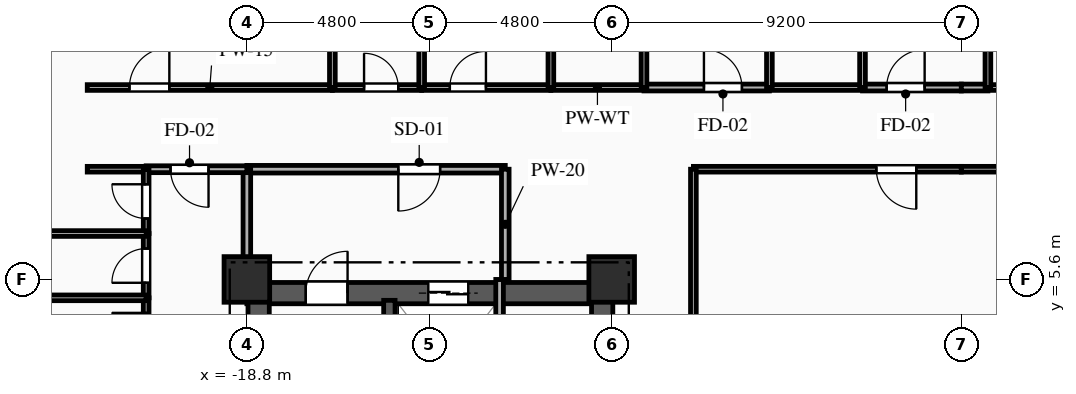
"""IFC4 building model, lengths in metres.
Left out: names, types, materials, properties, quantities, classifications, styles, units other than length and angle.
Written with IfcOpenShell. Run it as: python <this file> out.ifc"""

import sys

from ifc_helpers import new_model, si_unit, direction, frame, frame_2d, origin, origin_2d, place, context, subcontext, project, spatial, rectangle, extrude, element, fill, save


model = new_model("IFC4")
c1 = context("Model", 3, precision=1e-05, world=origin(), true_north=direction((0.0, 1.0)))
c2 = subcontext(c1, "Body", "Model", "MODEL_VIEW")
j1 = project(units=[si_unit("LENGTHUNIT", "METRE"), si_unit("PLANEANGLEUNIT", "RADIAN")], contexts=[c1])
p1 = place(None, origin())
s1 = spatial("IfcSite", under=j1, at=p1, CompositionType="ELEMENT")
p2 = place(p1, origin())
s2 = spatial("IfcBuilding", under=s1, at=p2, CompositionType="ELEMENT")
p3 = place(p2, frame((0.0, 0.0, 53.8)))
s3 = spatial("IfcBuildingStorey", under=s2, at=p3, CompositionType="ELEMENT", Elevation=53.8)
for number, where, z_axis, x_axis in (
    (1, (-18.8, 5.6, 0.0), (0.0, 0.0, 1.0), (1.0, 0.0, 0.0)),
    (2, (-9.2, 5.6, 0.0), (0.0, 0.0, 1.0), (1.0, 0.0, 0.0)),
):
    element("IfcColumn", number, at=place(p3, frame(where, z_axis=z_axis, x_axis=x_axis)), inside=s3, PredefinedType="COLUMN", context=c2, shape_type="SweptSolid", body=[
        extrude(rectangle(XDim=1.2, YDim=1.2, at=origin_2d()), origin(), (0.0, 0.0, 1.0), 3.35),
    ])
p4 = place(p3, frame((-18.8, 5.24, 0.0), z_axis=(0.0, 0.0, 1.0), x_axis=(1.0, 0.0, 0.0)))
e3 = element("IfcWall", 3, at=p4, inside=s3, PredefinedType="SHEAR", context=c2, shape_type="SweptSolid", body=[
    extrude(rectangle(XDim=9.6, YDim=0.56, at=frame_2d((4.8, 0.0))), origin(), (0.0, 0.0, 1.0), 3.035),
])
p5 = place(p4, frame((1.55, 0.0, 0.0)))
e4 = element("IfcOpeningElement", 4, at=p5, cuts=e3, PredefinedType="OPENING", context=c2, shape_type="SweptSolid", body=[
    extrude(rectangle(XDim=1.1, YDim=2.15, at=frame_2d((0.55, 1.075))), frame((0.0, 0.29, 0.0), z_axis=(0.0, -1.0, 0.0), x_axis=(1.0, 0.0, 0.0)), (0.0, 0.0, 1.0), 0.58),
])
p6 = place(p4, frame((4.775, 0.0, 0.0)))
e5 = element("IfcOpeningElement", 5, at=p6, cuts=e3, PredefinedType="OPENING", context=c2, shape_type="SweptSolid", body=[
    extrude(rectangle(XDim=1.05, YDim=2.1, at=frame_2d((0.525, 1.05))), frame((0.0, 0.29, 0.0), z_axis=(0.0, -1.0, 0.0), x_axis=(1.0, 0.0, 0.0)), (0.0, 0.0, 1.0), 0.58),
])
p7 = place(p3, frame((-18.49, -5.05, 0.0), z_axis=(0.0, 0.0, 1.0), x_axis=(0.0, 1.0, 0.0)))
e6 = element("IfcWall", 6, at=p7, inside=s3, PredefinedType="SHEAR", context=c2, shape_type="SweptSolid", body=[
    extrude(rectangle(XDim=10.1, YDim=0.56, at=frame_2d((5.05, 0.0))), origin(), (0.0, 0.0, 1.0), 3.035),
])
p8 = place(p3, frame((-9.45, -5.05, 0.0), z_axis=(0.0, 0.0, 1.0), x_axis=(0.0, 1.0, 0.0)))
e7 = element("IfcWall", 7, at=p8, inside=s3, PredefinedType="SHEAR", context=c2, shape_type="SweptSolid", body=[
    extrude(rectangle(XDim=10.1, YDim=0.56, at=frame_2d((5.05, 0.0))), origin(), (0.0, 0.0, 1.0), 3.035),
])
p9 = place(p8, frame((7.15, 0.0, 0.0)))
e8 = element("IfcOpeningElement", 8, at=p9, cuts=e7, PredefinedType="OPENING", context=c2, shape_type="SweptSolid", body=[
    extrude(rectangle(XDim=0.9, YDim=2.1, at=frame_2d((0.45, 1.05))), frame((0.0, 0.29, 0.0), z_axis=(0.0, -1.0, 0.0), x_axis=(1.0, 0.0, 0.0)), (0.0, 0.0, 1.0), 0.58),
])
p10 = place(p8, frame((2.4, 0.0, 0.0)))
e9 = element("IfcOpeningElement", 9, at=p10, cuts=e7, PredefinedType="OPENING", context=c2, shape_type="SweptSolid", body=[
    extrude(rectangle(XDim=1.2, YDim=2.15, at=frame_2d((0.6, 1.075))), frame((0.0, 0.29, 0.0), z_axis=(0.0, -1.0, 0.0), x_axis=(1.0, 0.0, 0.0)), (0.0, 0.0, 1.0), 0.58),
])
p11 = place(p3, frame((-15.05, -5.05, 0.0), z_axis=(0.0, 0.0, 1.0), x_axis=(0.0, 1.0, 0.0)))
e10 = element("IfcWall", 10, at=p11, inside=s3, PredefinedType="SHEAR", context=c2, shape_type="SweptSolid", body=[
    extrude(rectangle(XDim=10.1, YDim=0.3, at=frame_2d((5.05, 0.0))), origin(), (0.0, 0.0, 1.0), 3.035),
])
p12 = place(p3, frame((-12.15, 1.55, 0.0), z_axis=(0.0, 0.0, 1.0), x_axis=(0.0, 1.0, 0.0)))
e11 = element("IfcWall", 11, at=p12, inside=s3, PredefinedType="PARTITIONING", context=c2, shape_type="SweptSolid", body=[
    extrude(rectangle(XDim=4.05, YDim=0.2, at=frame_2d((2.025, 0.0))), origin(), (0.0, 0.0, 1.0), 3.035),
])
p13 = place(p3, frame((-12.0, 8.5, 0.0), z_axis=(0.0, 0.0, 1.0), x_axis=(-1.0, 0.0, 0.0)))
e12 = element("IfcWall", 12, at=p13, inside=s3, PredefinedType="PARTITIONING", context=c2, shape_type="SweptSolid", body=[
    extrude(rectangle(XDim=6.8, YDim=0.2, at=frame_2d((3.4, 0.0))), origin(), (0.0, 0.0, 1.0), 3.035),
])
p14 = place(p13, frame((1.715, 0.0, 0.0)))
e13 = element("IfcOpeningElement", 13, at=p14, cuts=e12, PredefinedType="OPENING", context=c2, shape_type="SweptSolid", body=[
    extrude(rectangle(XDim=1.1, YDim=2.15, at=frame_2d((0.55, 1.075))), frame((0.0, 0.11, 0.0), z_axis=(0.0, -1.0, 0.0), x_axis=(1.0, 0.0, 0.0)), (0.0, 0.0, 1.0), 0.22),
])
p15 = place(p3, frame((-12.0, 5.6, 0.0), z_axis=(0.0, 0.0, 1.0), x_axis=(0.0, 1.0, 0.0)))
e14 = element("IfcWall", 14, at=p15, inside=s3, PredefinedType="PARTITIONING", context=c2, shape_type="SweptSolid", body=[
    extrude(rectangle(XDim=2.9, YDim=0.2, at=frame_2d((1.45, 0.0))), origin(), (0.0, 0.0, 1.0), 3.035),
])
p16 = place(p3, frame((-18.8, 8.5, 0.0), z_axis=(0.0, 0.0, 1.0), x_axis=(0.0, -1.0, 0.0)))
e15 = element("IfcWall", 15, at=p16, inside=s3, PredefinedType="PARTITIONING", context=c2, shape_type="SweptSolid", body=[
    extrude(rectangle(XDim=2.9, YDim=0.2, at=frame_2d((1.45, 0.0))), origin(), (0.0, 0.0, 1.0), 2.52),
])
p17 = place(p3, frame((-18.8, 8.5, 0.0), z_axis=(0.0, 0.0, 1.0), x_axis=(-1.0, 0.0, 0.0)))
e16 = element("IfcWall", 16, at=p17, inside=s3, PredefinedType="PARTITIONING", context=c2, shape_type="SweptSolid", body=[
    extrude(rectangle(XDim=2.65, YDim=0.18, at=frame_2d((1.325, 0.0))), origin(), (0.0, 0.0, 1.0), 3.035),
])
p18 = place(p17, frame((1.009, 0.0, 0.0)))
e17 = element("IfcOpeningElement", 17, at=p18, cuts=e16, PredefinedType="OPENING", context=c2, shape_type="SweptSolid", body=[
    extrude(rectangle(XDim=1.0, YDim=2.15, at=frame_2d((0.5, 1.075))), frame((0.0, 0.1, 0.0), z_axis=(0.0, -1.0, 0.0), x_axis=(1.0, 0.0, 0.0)), (0.0, 0.0, 1.0), 0.2),
])
p19 = place(p3, frame((-21.45, 8.5, 0.0), z_axis=(0.0, 0.0, 1.0), x_axis=(-1.0, 0.0, 0.0)))
e18 = element("IfcWall", 18, at=p19, inside=s3, PredefinedType="PARTITIONING", context=c2, shape_type="SweptSolid", body=[
    extrude(rectangle(XDim=1.55, YDim=0.15, at=frame_2d((0.775, 0.0))), origin(), (0.0, 0.0, 1.0), 3.035),
])
p20 = place(p3, frame((-23.0, 10.65, 0.0), z_axis=(0.0, 0.0, 1.0), x_axis=(1.0, 0.0, 0.0)))
e19 = element("IfcWall", 19, at=p20, inside=s3, PredefinedType="PARTITIONING", context=c2, shape_type="SweptSolid", body=[
    extrude(rectangle(XDim=6.45, YDim=0.15, at=frame_2d((3.225, 0.0))), origin(), (0.0, 0.0, 1.0), 3.035),
])
p21 = place(p20, frame((1.11, 0.0, 0.0)))
e20 = element("IfcOpeningElement", 20, at=p21, cuts=e19, PredefinedType="OPENING", context=c2, shape_type="SweptSolid", body=[
    extrude(rectangle(XDim=1.05, YDim=2.15, at=frame_2d((0.525, 1.075))), frame((0.0, 0.085, 0.0), z_axis=(0.0, -1.0, 0.0), x_axis=(1.0, 0.0, 0.0)), (0.0, 0.0, 1.0), 0.17),
])
p22 = place(p3, frame((-16.55, 10.65, 0.0), z_axis=(0.0, 0.0, 1.0), x_axis=(1.0, 0.0, 0.0)))
e21 = element("IfcWall", 21, at=p22, inside=s3, PredefinedType="PLUMBINGWALL", context=c2, shape_type="SweptSolid", body=[
    extrude(rectangle(XDim=2.35, YDim=0.15, at=frame_2d((1.175, 0.0))), origin(), (0.0, 0.0, 1.0), 3.035),
])
p23 = place(p22, frame((0.834, 0.0, 0.0)))
e22 = element("IfcOpeningElement", 22, at=p23, cuts=e21, PredefinedType="OPENING", context=c2, shape_type="SweptSolid", body=[
    extrude(rectangle(XDim=0.9, YDim=2.1, at=frame_2d((0.45, 1.05))), frame((0.0, 0.085, 0.0), z_axis=(0.0, -1.0, 0.0), x_axis=(1.0, 0.0, 0.0)), (0.0, 0.0, 1.0), 0.17),
])
p24 = place(p3, frame((-14.2, 10.65, 0.0), z_axis=(0.0, 0.0, 1.0), x_axis=(1.0, 0.0, 0.0)))
e23 = element("IfcWall", 23, at=p24, inside=s3, PredefinedType="PARTITIONING", context=c2, shape_type="SweptSolid", body=[
    extrude(rectangle(XDim=3.4, YDim=0.15, at=frame_2d((1.7, 0.0))), origin(), (0.0, 0.0, 1.0), 3.035),
])
p25 = place(p24, frame((0.741, 0.0, 0.0)))
e24 = element("IfcOpeningElement", 24, at=p25, cuts=e23, PredefinedType="OPENING", context=c2, shape_type="SweptSolid", body=[
    extrude(rectangle(XDim=0.95, YDim=2.1, at=frame_2d((0.475, 1.05))), frame((0.0, 0.085, 0.0), z_axis=(0.0, -1.0, 0.0), x_axis=(1.0, 0.0, 0.0)), (0.0, 0.0, 1.0), 0.17),
])
p26 = place(p3, frame((-8.35, 10.65, 0.0), z_axis=(0.0, 0.0, 1.0), x_axis=(1.0, 0.0, 0.0)))
e25 = element("IfcWall", 25, at=p26, inside=s3, PredefinedType="PARTITIONING", context=c2, shape_type="SweptSolid", body=[
    extrude(rectangle(XDim=3.3, YDim=0.18, at=frame_2d((1.65, 0.0))), origin(), (0.0, 0.0, 1.0), 3.035),
])
p27 = place(p26, frame((1.577, 0.0, 0.0)))
e26 = element("IfcOpeningElement", 26, at=p27, cuts=e25, PredefinedType="OPENING", context=c2, shape_type="SweptSolid", body=[
    extrude(rectangle(XDim=1.0, YDim=2.15, at=frame_2d((0.5, 1.075))), frame((0.0, 0.1, 0.0), z_axis=(0.0, -1.0, 0.0), x_axis=(1.0, 0.0, 0.0)), (0.0, 0.0, 1.0), 0.2),
])
p28 = place(p3, frame((-10.8, 10.65, 0.0), z_axis=(0.0, 0.0, 1.0), x_axis=(1.0, 0.0, 0.0)))
e27 = element("IfcWall", 27, at=p28, inside=s3, PredefinedType="PLUMBINGWALL", context=c2, shape_type="SweptSolid", body=[
    extrude(rectangle(XDim=2.45, YDim=0.15, at=frame_2d((1.225, 0.0))), origin(), (0.0, 0.0, 1.0), 3.035),
])
p29 = place(p3, frame((-2.6, 10.65, 0.0), z_axis=(0.0, 0.0, 1.0), x_axis=(1.0, 0.0, 0.0)))
e28 = element("IfcWall", 28, at=p29, inside=s3, PredefinedType="PARTITIONING", context=c2, shape_type="SweptSolid", body=[
    extrude(rectangle(XDim=2.6, YDim=0.18, at=frame_2d((1.3, 0.0))), origin(), (0.0, 0.0, 1.0), 3.035),
])
p30 = place(p29, frame((0.635, 0.0, 0.0)))
e29 = element("IfcOpeningElement", 29, at=p30, cuts=e28, PredefinedType="OPENING", context=c2, shape_type="SweptSolid", body=[
    extrude(rectangle(XDim=1.0, YDim=2.15, at=frame_2d((0.5, 1.075))), frame((0.0, 0.1, 0.0), z_axis=(0.0, -1.0, 0.0), x_axis=(1.0, 0.0, 0.0)), (0.0, 0.0, 1.0), 0.2),
])
p31 = place(p3, frame((-5.05, 10.65, 0.0), z_axis=(0.0, 0.0, 1.0), x_axis=(1.0, 0.0, 0.0)))
e30 = element("IfcWall", 30, at=p31, inside=s3, PredefinedType="PLUMBINGWALL", context=c2, shape_type="SweptSolid", body=[
    extrude(rectangle(XDim=2.45, YDim=0.15, at=frame_2d((1.225, 0.0))), origin(), (0.0, 0.0, 1.0), 3.035),
])
p32 = place(p3, frame((0.0, 8.5, 0.0), z_axis=(0.0, 0.0, 1.0), x_axis=(-1.0, 0.0, 0.0)))
e31 = element("IfcWall", 31, at=p32, inside=s3, PredefinedType="PARTITIONING", context=c2, shape_type="SweptSolid", body=[
    extrude(rectangle(XDim=7.05, YDim=0.15, at=frame_2d((3.525, 0.0))), origin(), (0.0, 0.0, 1.0), 3.035),
])
p33 = place(p32, frame((1.185, 0.0, 0.0)))
e32 = element("IfcOpeningElement", 32, at=p33, cuts=e31, PredefinedType="OPENING", context=c2, shape_type="SweptSolid", body=[
    extrude(rectangle(XDim=1.05, YDim=2.15, at=frame_2d((0.525, 1.075))), frame((0.0, 0.085, 0.0), z_axis=(0.0, -1.0, 0.0), x_axis=(1.0, 0.0, 0.0)), (0.0, 0.0, 1.0), 0.17),
])
p34 = place(p3, frame((0.0, 10.65, 0.0), z_axis=(0.0, 0.0, 1.0), x_axis=(1.0, 0.0, 0.0)))
e33 = element("IfcWall", 33, at=p34, inside=s3, PredefinedType="PARTITIONING", context=c2, shape_type="SweptSolid", body=[
    extrude(rectangle(XDim=0.7, YDim=0.18, at=frame_2d((0.35, 0.0))), origin(), (0.0, 0.0, 1.0), 3.035),
])
p35 = place(p3, frame((0.7, 10.65, 0.0), z_axis=(0.0, 0.0, 1.0), x_axis=(1.0, 0.0, 0.0)))
e34 = element("IfcWall", 34, at=p35, inside=s3, PredefinedType="PLUMBINGWALL", context=c2, shape_type="SweptSolid", body=[
    extrude(rectangle(XDim=2.45, YDim=0.15, at=frame_2d((1.225, 0.0))), origin(), (0.0, 0.0, 1.0), 3.035),
])
for number, where, z_axis, x_axis in (
    (35, (7.05, 8.5, 0.0), (0.0, 0.0, 1.0), (-1.0, 0.0, 0.0)),
    (36, (-7.05, 8.5, 0.0), (0.0, 0.0, 1.0), (0.0, -1.0, 0.0)),
):
    element("IfcWall", number, at=place(p3, frame(where, z_axis=z_axis, x_axis=x_axis)), inside=s3, PredefinedType="PARTITIONING", context=c2, shape_type="SweptSolid", body=[
        extrude(rectangle(XDim=7.05, YDim=0.15, at=frame_2d((3.525, 0.0))), origin(), (0.0, 0.0, 1.0), 3.035),
    ])
p36 = place(p3, frame((-21.45, 3.424, 0.0), z_axis=(0.0, 0.0, 1.0), x_axis=(0.0, 1.0, 0.0)))
e37 = element("IfcWall", 37, at=p36, inside=s3, PredefinedType="PARTITIONING", context=c2, shape_type="SweptSolid", body=[
    extrude(rectangle(XDim=1.692, YDim=0.15, at=frame_2d((0.846, 0.0))), origin(), (0.0, 0.0, 1.0), 3.035),
])
p37 = place(p36, frame((0.396, 0.0, 0.0)))
e38 = element("IfcOpeningElement", 38, at=p37, cuts=e37, PredefinedType="OPENING", context=c2, shape_type="SweptSolid", body=[
    extrude(rectangle(XDim=0.9, YDim=2.1, at=frame_2d((0.45, 1.05))), frame((0.0, 0.085, 0.0), z_axis=(0.0, -1.0, 0.0), x_axis=(1.0, 0.0, 0.0)), (0.0, 0.0, 1.0), 0.17),
])
p38 = place(p3, frame((-21.45, 5.116, 0.0), z_axis=(0.0, 0.0, 1.0), x_axis=(0.0, 1.0, 0.0)))
e39 = element("IfcWall", 39, at=p38, inside=s3, PredefinedType="PARTITIONING", context=c2, shape_type="SweptSolid", body=[
    extrude(rectangle(XDim=1.692, YDim=0.15, at=frame_2d((0.846, 0.0))), origin(), (0.0, 0.0, 1.0), 3.035),
])
p39 = place(p38, frame((0.396, 0.0, 0.0)))
e40 = element("IfcOpeningElement", 40, at=p39, cuts=e39, PredefinedType="OPENING", context=c2, shape_type="SweptSolid", body=[
    extrude(rectangle(XDim=0.9, YDim=2.1, at=frame_2d((0.45, 1.05))), frame((0.0, 0.085, 0.0), z_axis=(0.0, -1.0, 0.0), x_axis=(1.0, 0.0, 0.0)), (0.0, 0.0, 1.0), 0.17),
])
p40 = place(p3, frame((-21.45, 6.808, 0.0), z_axis=(0.0, 0.0, 1.0), x_axis=(0.0, 1.0, 0.0)))
e41 = element("IfcWall", 41, at=p40, inside=s3, PredefinedType="PARTITIONING", context=c2, shape_type="SweptSolid", body=[
    extrude(rectangle(XDim=1.692, YDim=0.15, at=frame_2d((0.846, 0.0))), origin(), (0.0, 0.0, 1.0), 3.035),
])
p41 = place(p40, frame((0.396, 0.0, 0.0)))
e42 = element("IfcOpeningElement", 42, at=p41, cuts=e41, PredefinedType="OPENING", context=c2, shape_type="SweptSolid", body=[
    extrude(rectangle(XDim=0.9, YDim=2.1, at=frame_2d((0.45, 1.05))), frame((0.0, 0.085, 0.0), z_axis=(0.0, -1.0, 0.0), x_axis=(1.0, 0.0, 0.0)), (0.0, 0.0, 1.0), 0.17),
])
p42 = place(p3, frame((-32.8, 5.116, 0.0), z_axis=(0.0, 0.0, 1.0), x_axis=(1.0, 0.0, 0.0)))
e43 = element("IfcWall", 43, at=p42, inside=s3, PredefinedType="PARTITIONING", context=c2, shape_type="SweptSolid", body=[
    extrude(rectangle(XDim=11.35, YDim=0.15, at=frame_2d((5.675, 0.0))), origin(), (0.0, 0.0, 1.0), 2.52),
])
p43 = place(p3, frame((-32.8, 6.808, 0.0), z_axis=(0.0, 0.0, 1.0), x_axis=(1.0, 0.0, 0.0)))
e44 = element("IfcWall", 44, at=p43, inside=s3, PredefinedType="PARTITIONING", context=c2, shape_type="SweptSolid", body=[
    extrude(rectangle(XDim=11.35, YDim=0.15, at=frame_2d((5.675, 0.0))), origin(), (0.0, 0.0, 1.0), 3.035),
])
for number, where, z_axis, x_axis in (
    (45, (-16.55, 19.4, 0.0), (0.0, 0.0, 1.0), (0.0, -1.0, 0.0)),
    (46, (-14.2, 19.4, 0.0), (0.0, 0.0, 1.0), (0.0, -1.0, 0.0)),
):
    element("IfcWall", number, at=place(p3, frame(where, z_axis=z_axis, x_axis=x_axis)), inside=s3, PredefinedType="PLUMBINGWALL", context=c2, shape_type="SweptSolid", body=[
        extrude(rectangle(XDim=8.75, YDim=0.15, at=frame_2d((4.375, 0.0))), origin(), (0.0, 0.0, 1.0), 3.035),
    ])
for number, where, z_axis, x_axis in (
    (47, (-10.8, 12.8, 0.0), (0.0, 0.0, 1.0), (0.0, -1.0, 0.0)),
    (48, (-8.35, 10.65, 0.0), (0.0, 0.0, 1.0), (0.0, 1.0, 0.0)),
    (49, (-5.05, 12.8, 0.0), (0.0, 0.0, 1.0), (0.0, -1.0, 0.0)),
    (50, (-2.6, 10.65, 0.0), (0.0, 0.0, 1.0), (0.0, 1.0, 0.0)),
    (51, (0.7, 12.8, 0.0), (0.0, 0.0, 1.0), (0.0, -1.0, 0.0)),
):
    element("IfcWall", number, at=place(p3, frame(where, z_axis=z_axis, x_axis=x_axis)), inside=s3, PredefinedType="PLUMBINGWALL", context=c2, shape_type="SweptSolid", body=[
        extrude(rectangle(XDim=2.15, YDim=0.15, at=frame_2d((1.075, 0.0))), origin(), (0.0, 0.0, 1.0), 3.035),
    ])
p44 = place(p5, origin())
e52 = element("IfcDoor", 52, at=p44, inside=s3, OperationType="SINGLE_SWING_RIGHT", PredefinedType="DOOR", context=c2, shape_type="SweptSolid", body=[
    extrude(rectangle(XDim=1.1, YDim=2.15, at=frame_2d((0.55, 1.075))), frame((0.0, 0.025, 0.0), z_axis=(0.0, -1.0, 0.0), x_axis=(1.0, 0.0, 0.0)), (0.0, 0.0, 1.0), 0.05),
])
fill(e4, e52)
p45 = place(p6, origin())
e53 = element("IfcDoor", 53, at=p45, inside=s3, OperationType="DOUBLE_DOOR_SLIDING", PredefinedType="DOOR", context=c2, shape_type="SweptSolid", body=[
    extrude(rectangle(XDim=1.05, YDim=2.1, at=frame_2d((0.525, 1.05))), frame((0.0, 0.025, 0.0), z_axis=(0.0, -1.0, 0.0), x_axis=(1.0, 0.0, 0.0)), (0.0, 0.0, 1.0), 0.05),
])
fill(e5, e53)
p46 = place(p14, origin())
e54 = element("IfcDoor", 54, at=p46, inside=s3, OperationType="SINGLE_SWING_RIGHT", PredefinedType="DOOR", context=c2, shape_type="SweptSolid", body=[
    extrude(rectangle(XDim=1.1, YDim=2.15, at=frame_2d((0.55, 1.075))), frame((0.0, 0.025, 0.0), z_axis=(0.0, -1.0, 0.0), x_axis=(1.0, 0.0, 0.0)), (0.0, 0.0, 1.0), 0.05),
])
fill(e13, e54)
p47 = place(p18, origin())
e55 = element("IfcDoor", 55, at=p47, inside=s3, OperationType="SINGLE_SWING_LEFT", PredefinedType="DOOR", context=c2, shape_type="SweptSolid", body=[
    extrude(rectangle(XDim=1.0, YDim=2.15, at=frame_2d((0.5, 1.075))), frame((0.0, 0.025, 0.0), z_axis=(0.0, -1.0, 0.0), x_axis=(1.0, 0.0, 0.0)), (0.0, 0.0, 1.0), 0.05),
])
fill(e17, e55)
p48 = place(p21, origin())
e56 = element("IfcDoor", 56, at=p48, inside=s3, OperationType="SINGLE_SWING_RIGHT", PredefinedType="DOOR", context=c2, shape_type="SweptSolid", body=[
    extrude(rectangle(XDim=1.05, YDim=2.15, at=frame_2d((0.525, 1.075))), frame((0.0, 0.025, 0.0), z_axis=(0.0, -1.0, 0.0), x_axis=(1.0, 0.0, 0.0)), (0.0, 0.0, 1.0), 0.05),
])
fill(e20, e56)
p49 = place(p23, origin())
e57 = element("IfcDoor", 57, at=p49, inside=s3, OperationType="SINGLE_SWING_LEFT", PredefinedType="DOOR", context=c2, shape_type="SweptSolid", body=[
    extrude(rectangle(XDim=0.9, YDim=2.1, at=frame_2d((0.45, 1.05))), frame((0.0, 0.025, 0.0), z_axis=(0.0, -1.0, 0.0), x_axis=(1.0, 0.0, 0.0)), (0.0, 0.0, 1.0), 0.05),
])
fill(e22, e57)
p50 = place(p25, origin())
e58 = element("IfcDoor", 58, at=p50, inside=s3, OperationType="SINGLE_SWING_RIGHT", PredefinedType="DOOR", context=c2, shape_type="SweptSolid", body=[
    extrude(rectangle(XDim=0.95, YDim=2.1, at=frame_2d((0.475, 1.05))), frame((0.0, 0.025, 0.0), z_axis=(0.0, -1.0, 0.0), x_axis=(1.0, 0.0, 0.0)), (0.0, 0.0, 1.0), 0.05),
])
fill(e24, e58)
p51 = place(p27, origin())
e59 = element("IfcDoor", 59, at=p51, inside=s3, OperationType="SINGLE_SWING_LEFT", PredefinedType="DOOR", context=c2, shape_type="SweptSolid", body=[
    extrude(rectangle(XDim=1.0, YDim=2.15, at=frame_2d((0.5, 1.075))), frame((0.0, 0.025, 0.0), z_axis=(0.0, -1.0, 0.0), x_axis=(1.0, 0.0, 0.0)), (0.0, 0.0, 1.0), 0.05),
])
fill(e26, e59)
p52 = place(p30, origin())
e60 = element("IfcDoor", 60, at=p52, inside=s3, OperationType="SINGLE_SWING_RIGHT", PredefinedType="DOOR", context=c2, shape_type="SweptSolid", body=[
    extrude(rectangle(XDim=1.0, YDim=2.15, at=frame_2d((0.5, 1.075))), frame((0.0, 0.025, 0.0), z_axis=(0.0, -1.0, 0.0), x_axis=(1.0, 0.0, 0.0)), (0.0, 0.0, 1.0), 0.05),
])
fill(e29, e60)
p53 = place(p33, origin())
e61 = element("IfcDoor", 61, at=p53, inside=s3, OperationType="SINGLE_SWING_LEFT", PredefinedType="DOOR", context=c2, shape_type="SweptSolid", body=[
    extrude(rectangle(XDim=1.05, YDim=2.15, at=frame_2d((0.525, 1.075))), frame((0.0, 0.025, 0.0), z_axis=(0.0, -1.0, 0.0), x_axis=(1.0, 0.0, 0.0)), (0.0, 0.0, 1.0), 0.05),
])
fill(e32, e61)
p54 = place(p37, origin())
e62 = element("IfcDoor", 62, at=p54, inside=s3, OperationType="SINGLE_SWING_RIGHT", PredefinedType="DOOR", context=c2, shape_type="SweptSolid", body=[
    extrude(rectangle(XDim=0.9, YDim=2.1, at=frame_2d((0.45, 1.05))), frame((0.0, 0.025, 0.0), z_axis=(0.0, -1.0, 0.0), x_axis=(1.0, 0.0, 0.0)), (0.0, 0.0, 1.0), 0.05),
])
fill(e38, e62)
p55 = place(p39, origin())
e63 = element("IfcDoor", 63, at=p55, inside=s3, OperationType="SINGLE_SWING_LEFT", PredefinedType="DOOR", context=c2, shape_type="SweptSolid", body=[
    extrude(rectangle(XDim=0.9, YDim=2.1, at=frame_2d((0.45, 1.05))), frame((0.0, 0.025, 0.0), z_axis=(0.0, -1.0, 0.0), x_axis=(1.0, 0.0, 0.0)), (0.0, 0.0, 1.0), 0.05),
])
fill(e40, e63)
p56 = place(p41, origin())
e64 = element("IfcDoor", 64, at=p56, inside=s3, OperationType="SINGLE_SWING_RIGHT", PredefinedType="DOOR", context=c2, shape_type="SweptSolid", body=[
    extrude(rectangle(XDim=0.9, YDim=2.1, at=frame_2d((0.45, 1.05))), frame((0.0, 0.025, 0.0), z_axis=(0.0, -1.0, 0.0), x_axis=(1.0, 0.0, 0.0)), (0.0, 0.0, 1.0), 0.05),
])
fill(e42, e64)
save(model, sys.argv[1])
